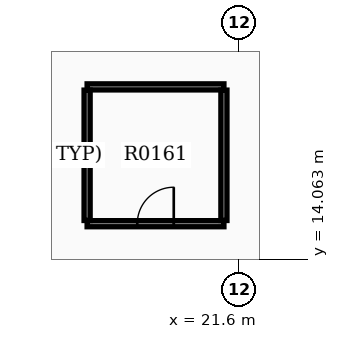
"""IFC4 building model, lengths in metres.
Left out: names, types, materials, properties, quantities, classifications, styles, units other than length and angle.
Written with IfcOpenShell. Run it as: python <this file> out.ifc"""

import sys

from ifc_helpers import new_model, si_unit, direction, frame, frame_2d, origin, place, context, subcontext, project, spatial, rectangle, extrude, element, fill, save


model = new_model("IFC4")
c1 = context("Model", 3, precision=1e-05, world=origin(), true_north=direction((0.0, 1.0)))
c2 = subcontext(c1, "Body", "Model", "MODEL_VIEW")
j1 = project(units=[si_unit("LENGTHUNIT", "METRE"), si_unit("PLANEANGLEUNIT", "RADIAN")], contexts=[c1])
p1 = place(None, origin())
s1 = spatial("IfcSite", under=j1, at=p1, CompositionType="ELEMENT")
p2 = place(p1, origin())
s2 = spatial("IfcBuilding", under=s1, at=p2, CompositionType="ELEMENT")
p3 = place(p2, frame((0.0, 0.0, 5.4)))
s3 = spatial("IfcBuildingStorey", under=s2, at=p3, CompositionType="ELEMENT", Elevation=5.4)
p4 = place(p3, frame((17.6, 15.0, 0.0), z_axis=(0.0, 0.0, 1.0), x_axis=(1.0, 0.0, 0.0)))
e1 = element("IfcWall", 1, at=p4, inside=s3, PredefinedType="PARTITIONING", context=c2, shape_type="SweptSolid", body=[
    extrude(rectangle(XDim=3.6, YDim=0.16, at=frame_2d((1.8, 0.0))), origin(), (0.0, 0.0, 1.0), 3.62),
])
p5 = place(p4, frame((1.32, 0.0, 0.0)))
e2 = element("IfcOpeningElement", 2, at=p5, cuts=e1, PredefinedType="OPENING", context=c2, shape_type="SweptSolid", body=[
    extrude(rectangle(XDim=0.96, YDim=2.15, at=frame_2d((0.48, 1.075))), frame((0.0, 0.09, 0.0), z_axis=(0.0, -1.0, 0.0), x_axis=(1.0, 0.0, 0.0)), (0.0, 0.0, 1.0), 0.18),
])
p6 = place(p3, frame((17.6, 18.6, 0.0), z_axis=(0.0, 0.0, 1.0), x_axis=(1.0, 0.0, 0.0)))
e3 = element("IfcWall", 3, at=p6, inside=s3, PredefinedType="PARTITIONING", context=c2, shape_type="SweptSolid", body=[
    extrude(rectangle(XDim=3.6, YDim=0.16, at=frame_2d((1.8, 0.0))), origin(), (0.0, 0.0, 1.0), 3.62),
])
for number, where, z_axis, x_axis in (
    (4, (17.6, 15.085, 0.0), (0.0, 0.0, 1.0), (0.0, 1.0, 0.0)),
    (5, (21.2, 15.085, 0.0), (0.0, 0.0, 1.0), (0.0, 1.0, 0.0)),
):
    element("IfcWall", number, at=place(p3, frame(where, z_axis=z_axis, x_axis=x_axis)), inside=s3, PredefinedType="PARTITIONING", context=c2, shape_type="SweptSolid", body=[
        extrude(rectangle(XDim=3.43, YDim=0.16, at=frame_2d((1.715, 0.0))), origin(), (0.0, 0.0, 1.0), 3.62),
    ])
p7 = place(p5, origin())
e6 = element("IfcDoor", 6, at=p7, inside=s3, OperationType="SINGLE_SWING_RIGHT", PredefinedType="DOOR", context=c2, shape_type="SweptSolid", body=[
    extrude(rectangle(XDim=0.96, YDim=2.15, at=frame_2d((0.48, 1.075))), frame((0.0, 0.025, 0.0), z_axis=(0.0, -1.0, 0.0), x_axis=(1.0, 0.0, 0.0)), (0.0, 0.0, 1.0), 0.05),
])
fill(e2, e6)
save(model, sys.argv[1])
